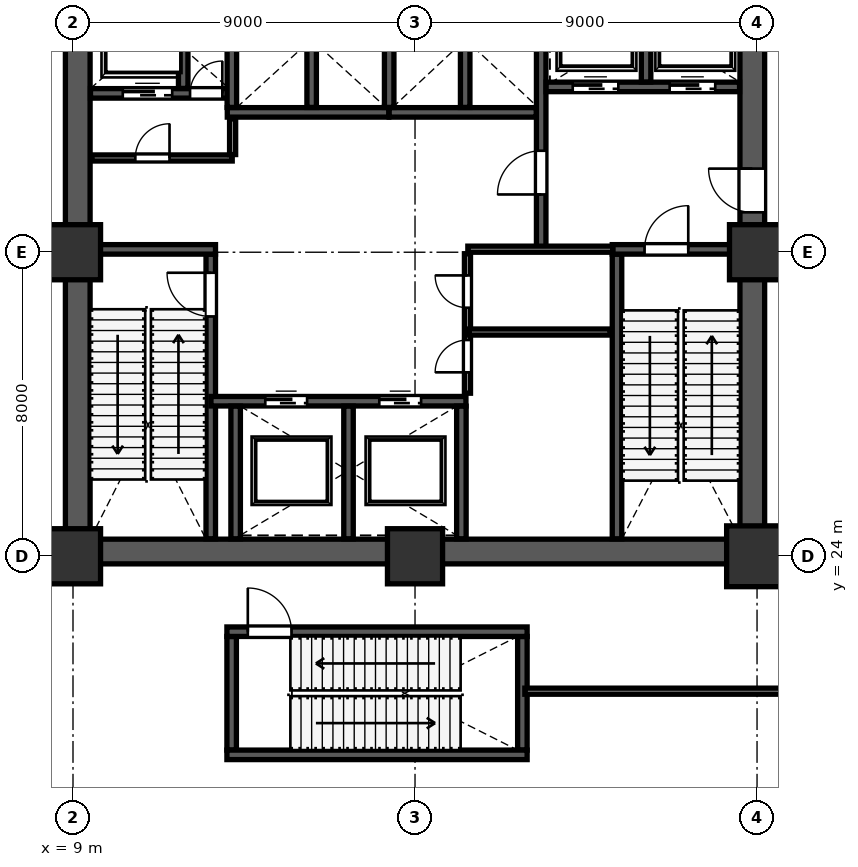
"""IFC4 building model, lengths in metres.
Left out: names, types, materials, properties, quantities, classifications, styles, units other than length and angle.
Written with IfcOpenShell. Run it as: python <this file> out.ifc"""

import sys

from ifc_helpers import new_model, si_unit, direction, frame, frame_2d, origin, origin_2d, place, context, subcontext, project, spatial, rectangle, extrude, source, transform, mapped, element, fill, save


model = new_model("IFC4")
c1 = context("Model", 3, precision=1e-05, world=origin(), true_north=direction((0.0, 1.0)))
c2 = subcontext(c1, "Body", "Model", "MODEL_VIEW")
j1 = project(units=[si_unit("LENGTHUNIT", "METRE"), si_unit("PLANEANGLEUNIT", "RADIAN")], contexts=[c1])
p1 = place(None, origin())
s1 = spatial("IfcSite", under=j1, at=p1, CompositionType="ELEMENT")
p2 = place(p1, origin())
s2 = spatial("IfcBuilding", under=s1, at=p2, CompositionType="ELEMENT")
p3 = place(p2, frame((0.0, 0.0, 22.2)))
s3 = spatial("IfcBuildingStorey", under=s2, at=p3, CompositionType="ELEMENT", Elevation=22.2)
m1 = source(origin(), c2, "Body", "SweptSolid", [
    extrude(rectangle(XDim=1.45, YDim=1.45, at=origin_2d()), origin(), (0.0, 0.0, 1.0), 5.799),
])
p4 = place(p3, frame((9.0, 24.0, 0.001), z_axis=(0.0, 0.0, 1.0), x_axis=(1.0, 0.0, 0.0)))
e1 = element("IfcColumn", 1, at=p4, inside=s3, PredefinedType="COLUMN", context=c2, shape_type="MappedRepresentation", body=[
    mapped(m1, transform((0.0, 0.0, 0.0), scale=1.0)),
])
m2 = source(origin(), c2, "Body", "SweptSolid", [
    extrude(rectangle(XDim=1.45, YDim=1.45, at=origin_2d()), origin(), (0.0, 0.0, 1.0), 5.799),
])
p5 = place(p3, frame((9.0, 32.0, 0.001), z_axis=(0.0, 0.0, 1.0), x_axis=(1.0, 0.0, 0.0)))
e2 = element("IfcColumn", 2, at=p5, inside=s3, PredefinedType="COLUMN", context=c2, shape_type="MappedRepresentation", body=[
    mapped(m2, transform((0.0, 0.0, 0.0), scale=1.0)),
])
p6 = place(p3, frame((18.0, 24.0, 0.001), z_axis=(0.0, 0.0, 1.0), x_axis=(1.0, 0.0, 0.0)))
e3 = element("IfcColumn", 3, at=p6, inside=s3, PredefinedType="COLUMN", context=c2, shape_type="MappedRepresentation", body=[
    mapped(m1, transform((0.0, 0.0, 0.0), scale=1.0)),
])
m3 = source(origin(), c2, "Body", "SweptSolid", [
    extrude(rectangle(XDim=1.6, YDim=1.6, at=origin_2d()), origin(), (0.0, 0.0, 1.0), 5.799),
])
p7 = place(p3, frame((27.0, 24.0, 0.001), z_axis=(0.0, 0.0, 1.0), x_axis=(1.0, 0.0, 0.0)))
e4 = element("IfcColumn", 4, at=p7, inside=s3, PredefinedType="COLUMN", context=c2, shape_type="MappedRepresentation", body=[
    mapped(m3, transform((0.0, 0.0, 0.0), scale=1.0)),
])
p8 = place(p3, frame((27.0, 32.0, 0.001), z_axis=(0.0, 0.0, 1.0), x_axis=(1.0, 0.0, 0.0)))
e5 = element("IfcColumn", 5, at=p8, inside=s3, PredefinedType="COLUMN", context=c2, shape_type="MappedRepresentation", body=[
    mapped(m2, transform((0.0, 0.0, 0.0), scale=1.0)),
])
p9 = place(p3, frame((9.125, 24.45, 0.0), z_axis=(0.0, 0.0, 1.0), x_axis=(0.0, 1.0, 0.0)))
e6 = element("IfcWall", 6, at=p9, inside=s3, PredefinedType="SHEAR", context=c2, shape_type="SweptSolid", body=[
    extrude(rectangle(XDim=15.1, YDim=0.65, at=frame_2d((7.55, 0.0))), origin(), (0.0, 0.0, 1.0), 5.52),
])
p10 = place(p3, frame((26.875, 24.45, 0.0), z_axis=(0.0, 0.0, 1.0), x_axis=(0.0, 1.0, 0.0)))
e7 = element("IfcWall", 7, at=p10, inside=s3, PredefinedType="SHEAR", context=c2, shape_type="SweptSolid", body=[
    extrude(rectangle(XDim=15.1, YDim=0.65, at=frame_2d((7.55, 0.0))), origin(), (0.0, 0.0, 1.0), 5.52),
])
p11 = place(p10, frame((8.6, 0.0, 0.0)))
e8 = element("IfcOpeningElement", 8, at=p11, cuts=e7, PredefinedType="OPENING", context=c2, shape_type="SweptSolid", body=[
    extrude(rectangle(XDim=1.15, YDim=2.2, at=frame_2d((0.575, 1.1))), frame((0.0, 0.335, 0.0), z_axis=(0.0, -1.0, 0.0), x_axis=(1.0, 0.0, 0.0)), (0.0, 0.0, 1.0), 0.67),
])
p12 = place(p3, frame((8.8, 24.125, 0.0), z_axis=(0.0, 0.0, 1.0), x_axis=(1.0, 0.0, 0.0)))
e9 = element("IfcWall", 9, at=p12, inside=s3, PredefinedType="SHEAR", context=c2, shape_type="SweptSolid", body=[
    extrude(rectangle(XDim=18.4, YDim=0.65, at=frame_2d((9.2, 0.0))), origin(), (0.0, 0.0, 1.0), 5.52),
])
p13 = place(p3, frame((12.625, 24.46, 0.0), z_axis=(0.0, 0.0, 1.0), x_axis=(0.0, 1.0, 0.0)))
e10 = element("IfcWall", 10, at=p13, inside=s3, PredefinedType="SHEAR", context=c2, shape_type="SweptSolid", body=[
    extrude(rectangle(XDim=7.49, YDim=0.25, at=frame_2d((3.745, 0.0))), origin(), (0.0, 0.0, 1.0), 5.52),
])
p14 = place(p13, frame((5.85, 0.0, 0.0)))
e11 = element("IfcOpeningElement", 11, at=p14, cuts=e10, PredefinedType="OPENING", context=c2, shape_type="SweptSolid", body=[
    extrude(rectangle(XDim=1.15, YDim=2.2, at=frame_2d((0.575, 1.1))), frame((0.0, 0.135, 0.0), z_axis=(0.0, -1.0, 0.0), x_axis=(1.0, 0.0, 0.0)), (0.0, 0.0, 1.0), 0.27),
])
p15 = place(p3, frame((9.46, 32.075, 0.0), z_axis=(0.0, 0.0, 1.0), x_axis=(1.0, 0.0, 0.0)))
e12 = element("IfcWall", 12, at=p15, inside=s3, PredefinedType="SHEAR", context=c2, shape_type="SweptSolid", body=[
    extrude(rectangle(XDim=3.29, YDim=0.25, at=frame_2d((1.645, 0.0))), origin(), (0.0, 0.0, 1.0), 5.52),
])
p16 = place(p3, frame((23.315, 24.46, 0.0), z_axis=(0.0, 0.0, 1.0), x_axis=(0.0, 1.0, 0.0)))
e13 = element("IfcWall", 13, at=p16, inside=s3, PredefinedType="SHEAR", context=c2, shape_type="SweptSolid", body=[
    extrude(rectangle(XDim=7.49, YDim=0.25, at=frame_2d((3.745, 0.0))), origin(), (0.0, 0.0, 1.0), 5.52),
])
p17 = place(p3, frame((23.19, 32.075, 0.0), z_axis=(0.0, 0.0, 1.0), x_axis=(1.0, 0.0, 0.0)))
e14 = element("IfcWall", 14, at=p17, inside=s3, PredefinedType="SHEAR", context=c2, shape_type="SweptSolid", body=[
    extrude(rectangle(XDim=3.35, YDim=0.25, at=frame_2d((1.675, 0.0))), origin(), (0.0, 0.0, 1.0), 5.52),
])
p18 = place(p17, frame((0.85, 0.0, 0.0)))
e15 = element("IfcOpeningElement", 15, at=p18, cuts=e14, PredefinedType="OPENING", context=c2, shape_type="SweptSolid", body=[
    extrude(rectangle(XDim=1.15, YDim=2.2, at=frame_2d((0.575, 1.1))), frame((0.0, 0.135, 0.0), z_axis=(0.0, -1.0, 0.0), x_axis=(1.0, 0.0, 0.0)), (0.0, 0.0, 1.0), 0.27),
])
p19 = place(p3, frame((21.32, 32.12, 0.0), z_axis=(0.0, 0.0, 1.0), x_axis=(0.0, 1.0, 0.0)))
e16 = element("IfcWall", 16, at=p19, inside=s3, PredefinedType="SHEAR", context=c2, shape_type="SweptSolid", body=[
    extrude(rectangle(XDim=7.42, YDim=0.25, at=frame_2d((3.71, 0.0))), origin(), (0.0, 0.0, 1.0), 5.52),
])
p20 = place(p19, frame((1.4, 0.0, 0.0)))
e17 = element("IfcOpeningElement", 17, at=p20, cuts=e16, PredefinedType="OPENING", context=c2, shape_type="SweptSolid", body=[
    extrude(rectangle(XDim=1.15, YDim=2.2, at=frame_2d((0.575, 1.1))), frame((0.0, 0.135, 0.0), z_axis=(0.0, -1.0, 0.0), x_axis=(1.0, 0.0, 0.0)), (0.0, 0.0, 1.0), 0.27),
])
p21 = place(p3, frame((9.46, 36.18, 0.0), z_axis=(0.0, 0.0, 1.0), x_axis=(1.0, 0.0, 0.0)))
e18 = element("IfcWall", 18, at=p21, inside=s3, PredefinedType="SHEAR", context=c2, shape_type="SweptSolid", body=[
    extrude(rectangle(XDim=3.79, YDim=0.25, at=frame_2d((1.895, 0.0))), origin(), (0.0, 0.0, 1.0), 5.52),
])
p22 = place(p21, frame((2.62, 0.0, 0.0)))
e19 = element("IfcOpeningElement", 19, at=p22, cuts=e18, PredefinedType="OPENING", context=c2, shape_type="SweptSolid", body=[
    extrude(rectangle(XDim=0.85, YDim=2.1, at=frame_2d((0.425, 1.05))), frame((0.0, 0.135, 0.0), z_axis=(0.0, -1.0, 0.0), x_axis=(1.0, 0.0, 0.0)), (0.0, 0.0, 1.0), 0.27),
])
p23 = place(p21, frame((0.85, 0.0, 0.0)))
e20 = element("IfcOpeningElement", 20, at=p23, cuts=e18, PredefinedType="OPENING", context=c2, shape_type="SweptSolid", body=[
    extrude(rectangle(XDim=1.3, YDim=2.25, at=frame_2d((0.65, 1.125))), frame((0.0, 0.135, 0.0), z_axis=(0.0, -1.0, 0.0), x_axis=(1.0, 0.0, 0.0)), (0.0, 0.0, 1.0), 0.27),
])
p24 = place(p3, frame((11.9, 36.31, 0.0), z_axis=(0.0, 0.0, 1.0), x_axis=(0.0, 1.0, 0.0)))
e21 = element("IfcWall", 21, at=p24, inside=s3, PredefinedType="SHEAR", context=c2, shape_type="SweptSolid", body=[
    extrude(rectangle(XDim=3.23, YDim=0.25, at=frame_2d((1.615, 0.0))), origin(), (0.0, 0.0, 1.0), 5.52),
])
p25 = place(p3, frame((21.45, 36.35, 0.0), z_axis=(0.0, 0.0, 1.0), x_axis=(1.0, 0.0, 0.0)))
e22 = element("IfcWall", 22, at=p25, inside=s3, PredefinedType="SHEAR", context=c2, shape_type="SweptSolid", body=[
    extrude(rectangle(XDim=5.09, YDim=0.25, at=frame_2d((2.545, 0.0))), origin(), (0.0, 0.0, 1.0), 5.52),
])
p26 = place(p25, frame((0.7, 0.0, 0.0)))
e23 = element("IfcOpeningElement", 23, at=p26, cuts=e22, PredefinedType="OPENING", context=c2, shape_type="SweptSolid", body=[
    extrude(rectangle(XDim=1.2, YDim=2.2, at=frame_2d((0.6, 1.1))), frame((0.0, 0.135, 0.0), z_axis=(0.0, -1.0, 0.0), x_axis=(1.0, 0.0, 0.0)), (0.0, 0.0, 1.0), 0.27),
])
p27 = place(p25, frame((3.25, 0.0, 0.0)))
e24 = element("IfcOpeningElement", 24, at=p27, cuts=e22, PredefinedType="OPENING", context=c2, shape_type="SweptSolid", body=[
    extrude(rectangle(XDim=1.2, YDim=2.2, at=frame_2d((0.6, 1.1))), frame((0.0, 0.135, 0.0), z_axis=(0.0, -1.0, 0.0), x_axis=(1.0, 0.0, 0.0)), (0.0, 0.0, 1.0), 0.27),
])
p28 = place(p3, frame((24.08, 36.48, 0.0), z_axis=(0.0, 0.0, 1.0), x_axis=(0.0, 1.0, 0.0)))
e25 = element("IfcWall", 25, at=p28, inside=s3, PredefinedType="SHEAR", context=c2, shape_type="SweptSolid", body=[
    extrude(rectangle(XDim=3.06, YDim=0.25, at=frame_2d((1.53, 0.0))), origin(), (0.0, 0.0, 1.0), 5.52),
])
p29 = place(p3, frame((12.63, 28.08, 0.0), z_axis=(0.0, 0.0, 1.0), x_axis=(1.0, 0.0, 0.0)))
e26 = element("IfcWall", 26, at=p29, inside=s3, PredefinedType="SHEAR", context=c2, shape_type="SweptSolid", body=[
    extrude(rectangle(XDim=6.71, YDim=0.25, at=frame_2d((3.355, 0.0))), origin(), (0.0, 0.0, 1.0), 5.52),
])
p30 = place(p29, frame((1.43, 0.0, 0.0)))
e27 = element("IfcOpeningElement", 27, at=p30, cuts=e26, PredefinedType="OPENING", context=c2, shape_type="SweptSolid", body=[
    extrude(rectangle(XDim=1.1, YDim=2.2, at=frame_2d((0.55, 1.1))), frame((0.0, 0.135, 0.0), z_axis=(0.0, -1.0, 0.0), x_axis=(1.0, 0.0, 0.0)), (0.0, 0.0, 1.0), 0.27),
])
p31 = place(p29, frame((4.43, 0.0, 0.0)))
e28 = element("IfcOpeningElement", 28, at=p31, cuts=e26, PredefinedType="OPENING", context=c2, shape_type="SweptSolid", body=[
    extrude(rectangle(XDim=1.1, YDim=2.2, at=frame_2d((0.55, 1.1))), frame((0.0, 0.135, 0.0), z_axis=(0.0, -1.0, 0.0), x_axis=(1.0, 0.0, 0.0)), (0.0, 0.0, 1.0), 0.27),
])
for number, where, z_axis, x_axis in (
    (29, (13.28, 24.46, 0.0), (0.0, 0.0, 1.0), (0.0, 1.0, 0.0)),
    (30, (16.25, 24.46, 0.0), (0.0, 0.0, 1.0), (0.0, 1.0, 0.0)),
    (31, (19.22, 24.46, 0.0), (0.0, 0.0, 1.0), (0.0, 1.0, 0.0)),
):
    element("IfcWall", number, at=place(p3, frame(where, z_axis=z_axis, x_axis=x_axis)), inside=s3, PredefinedType="SHEAR", context=c2, shape_type="SweptSolid", body=[
        extrude(rectangle(XDim=3.49, YDim=0.25, at=frame_2d((1.745, 0.0))), origin(), (0.0, 0.0, 1.0), 5.52),
    ])
p32 = place(p3, frame((13.06, 35.68, 0.0), z_axis=(0.0, 0.0, 1.0), x_axis=(1.0, 0.0, 0.0)))
e32 = element("IfcWall", 32, at=p32, inside=s3, PredefinedType="SHEAR", context=c2, shape_type="SweptSolid", body=[
    extrude(rectangle(XDim=4.25, YDim=0.25, at=frame_2d((2.125, 0.0))), origin(), (0.0, 0.0, 1.0), 5.52),
])
for number, where, z_axis, x_axis in (
    (33, (13.18, 35.81, 0.0), (0.0, 0.0, 1.0), (0.0, 1.0, 0.0)),
    (34, (15.28, 35.81, 0.0), (0.0, 0.0, 1.0), (0.0, 1.0, 0.0)),
):
    element("IfcWall", number, at=place(p3, frame(where, z_axis=z_axis, x_axis=x_axis)), inside=s3, PredefinedType="SHEAR", context=c2, shape_type="SweptSolid", body=[
        extrude(rectangle(XDim=3.73, YDim=0.25, at=frame_2d((1.865, 0.0))), origin(), (0.0, 0.0, 1.0), 5.52),
    ])
p33 = place(p3, frame((17.32, 35.68, 0.0), z_axis=(0.0, 0.0, 1.0), x_axis=(1.0, 0.0, 0.0)))
e35 = element("IfcWall", 35, at=p33, inside=s3, PredefinedType="SHEAR", context=c2, shape_type="SweptSolid", body=[
    extrude(rectangle(XDim=3.87, YDim=0.25, at=frame_2d((1.935, 0.0))), origin(), (0.0, 0.0, 1.0), 5.52),
])
for number, where, z_axis, x_axis in (
    (36, (17.32, 35.81, 0.0), (0.0, 0.0, 1.0), (0.0, 1.0, 0.0)),
    (37, (19.32, 35.81, 0.0), (0.0, 0.0, 1.0), (0.0, 1.0, 0.0)),
):
    element("IfcWall", number, at=place(p3, frame(where, z_axis=z_axis, x_axis=x_axis)), inside=s3, PredefinedType="SHEAR", context=c2, shape_type="SweptSolid", body=[
        extrude(rectangle(XDim=3.73, YDim=0.25, at=frame_2d((1.865, 0.0))), origin(), (0.0, 0.0, 1.0), 5.52),
    ])
for number, where, z_axis, x_axis in (
    (38, (13.175, 18.9, 0.0), (0.0, 0.0, 1.0), (0.0, 1.0, 0.0)),
    (39, (20.825, 18.9, 0.0), (0.0, 0.0, 1.0), (0.0, 1.0, 0.0)),
):
    element("IfcWall", number, at=place(p3, frame(where, z_axis=z_axis, x_axis=x_axis)), inside=s3, PredefinedType="SHEAR", context=c2, shape_type="SweptSolid", body=[
        extrude(rectangle(XDim=2.99, YDim=0.25, at=frame_2d((1.495, 0.0))), origin(), (0.0, 0.0, 1.0), 5.52),
    ])
p34 = place(p3, frame((13.05, 18.775, 0.0), z_axis=(0.0, 0.0, 1.0), x_axis=(1.0, 0.0, 0.0)))
e40 = element("IfcWall", 40, at=p34, inside=s3, PredefinedType="SHEAR", context=c2, shape_type="SweptSolid", body=[
    extrude(rectangle(XDim=7.9, YDim=0.25, at=frame_2d((3.95, 0.0))), origin(), (0.0, 0.0, 1.0), 5.52),
])
p35 = place(p3, frame((13.05, 22.015, 0.0), z_axis=(0.0, 0.0, 1.0), x_axis=(1.0, 0.0, 0.0)))
e41 = element("IfcWall", 41, at=p35, inside=s3, PredefinedType="SHEAR", context=c2, shape_type="SweptSolid", body=[
    extrude(rectangle(XDim=7.9, YDim=0.25, at=frame_2d((3.95, 0.0))), origin(), (0.0, 0.0, 1.0), 5.52),
])
p36 = place(p35, frame((0.55, 0.0, 0.0)))
e42 = element("IfcOpeningElement", 42, at=p36, cuts=e41, PredefinedType="OPENING", context=c2, shape_type="SweptSolid", body=[
    extrude(rectangle(XDim=1.15, YDim=2.2, at=frame_2d((0.575, 1.1))), frame((0.0, 0.135, 0.0), z_axis=(0.0, -1.0, 0.0), x_axis=(1.0, 0.0, 0.0)), (0.0, 0.0, 1.0), 0.27),
])
p37 = place(p3, frame((9.49, 34.48, 0.0), z_axis=(0.0, 0.0, 1.0), x_axis=(1.0, 0.0, 0.0)))
e43 = element("IfcWall", 43, at=p37, inside=s3, PredefinedType="PARTITIONING", context=c2, shape_type="SweptSolid", body=[
    extrude(rectangle(XDim=3.7, YDim=0.16, at=frame_2d((1.85, 0.0))), origin(), (0.0, 0.0, 1.0), 5.52),
])
p38 = place(p37, frame((1.15, 0.0, 0.0)))
e44 = element("IfcOpeningElement", 44, at=p38, cuts=e43, PredefinedType="OPENING", context=c2, shape_type="SweptSolid", body=[
    extrude(rectangle(XDim=0.9, YDim=2.15, at=frame_2d((0.45, 1.075))), frame((0.0, 0.09, 0.0), z_axis=(0.0, -1.0, 0.0), x_axis=(1.0, 0.0, 0.0)), (0.0, 0.0, 1.0), 0.18),
])
p39 = place(p3, frame((13.2, 34.57, 0.0), z_axis=(0.0, 0.0, 1.0), x_axis=(0.0, 1.0, 0.0)))
e45 = element("IfcWall", 45, at=p39, inside=s3, PredefinedType="PARTITIONING", context=c2, shape_type="SweptSolid", body=[
    extrude(rectangle(XDim=0.94, YDim=0.16, at=frame_2d((0.47, 0.0))), origin(), (0.0, 0.0, 1.0), 5.52),
])
p40 = place(p3, frame((19.39, 32.08, 0.0), z_axis=(0.0, 0.0, 1.0), x_axis=(1.0, 0.0, 0.0)))
e46 = element("IfcWall", 46, at=p40, inside=s3, PredefinedType="PARTITIONING", context=c2, shape_type="SweptSolid", body=[
    extrude(rectangle(XDim=3.82, YDim=0.16, at=frame_2d((1.91, 0.0))), origin(), (0.0, 0.0, 1.0), 5.52),
])
p41 = place(p3, frame((19.38, 28.29, 0.0), z_axis=(0.0, 0.0, 1.0), x_axis=(0.0, 1.0, 0.0)))
e47 = element("IfcWall", 47, at=p41, inside=s3, PredefinedType="PARTITIONING", context=c2, shape_type="SweptSolid", body=[
    extrude(rectangle(XDim=3.67, YDim=0.16, at=frame_2d((1.835, 0.0))), origin(), (0.0, 0.0, 1.0), 5.52),
])
p42 = place(p41, frame((0.55, 0.0, 0.0)))
e48 = element("IfcOpeningElement", 48, at=p42, cuts=e47, PredefinedType="OPENING", context=c2, shape_type="SweptSolid", body=[
    extrude(rectangle(XDim=0.85, YDim=2.1, at=frame_2d((0.425, 1.05))), frame((0.0, 0.09, 0.0), z_axis=(0.0, -1.0, 0.0), x_axis=(1.0, 0.0, 0.0)), (0.0, 0.0, 1.0), 0.18),
])
p43 = place(p41, frame((2.25, 0.0, 0.0)))
e49 = element("IfcOpeningElement", 49, at=p43, cuts=e47, PredefinedType="OPENING", context=c2, shape_type="SweptSolid", body=[
    extrude(rectangle(XDim=0.85, YDim=2.1, at=frame_2d((0.425, 1.05))), frame((0.0, 0.09, 0.0), z_axis=(0.0, -1.0, 0.0), x_axis=(1.0, 0.0, 0.0)), (0.0, 0.0, 1.0), 0.18),
])
p44 = place(p3, frame((19.42, 29.9, 0.0), z_axis=(0.0, 0.0, 1.0), x_axis=(1.0, 0.0, 0.0)))
e50 = element("IfcWall", 50, at=p44, inside=s3, PredefinedType="PARTITIONING", context=c2, shape_type="SweptSolid", body=[
    extrude(rectangle(XDim=3.72, YDim=0.16, at=frame_2d((1.86, 0.0))), origin(), (0.0, 0.0, 1.0), 5.52),
])
p45 = place(p3, frame((20.89, 20.45, 0.0), z_axis=(0.0, 0.0, 1.0), x_axis=(1.0, 0.0, 0.0)))
e51 = element("IfcWall", 51, at=p45, inside=s3, PredefinedType="PARTITIONING", context=c2, shape_type="SweptSolid", body=[
    extrude(rectangle(XDim=27.07, YDim=0.16, at=frame_2d((13.535, 0.0))), origin(), (0.0, 0.0, 1.0), 4.65),
])
p46 = place(p45, frame((10.6, 0.0, 0.0)))
e52 = element("IfcOpeningElement", 52, at=p46, cuts=e51, PredefinedType="OPENING", context=c2, shape_type="SweptSolid", body=[
    extrude(rectangle(XDim=1.1, YDim=2.2, at=frame_2d((0.55, 1.1))), frame((0.0, 0.09, 0.0), z_axis=(0.0, -1.0, 0.0), x_axis=(1.0, 0.0, 0.0)), (0.0, 0.0, 1.0), 0.18),
])
m4 = source(origin(), c2, "Body", "SweptSolid", [
    extrude(rectangle(XDim=1.15, YDim=2.2, at=frame_2d((0.575, 1.1))), frame((0.0, 0.025, 0.0), z_axis=(0.0, -1.0, 0.0), x_axis=(1.0, 0.0, 0.0)), (0.0, 0.0, 1.0), 0.05),
])
p47 = place(p14, origin())
e53 = element("IfcDoor", 53, at=p47, inside=s3, OperationType="SINGLE_SWING_RIGHT", PredefinedType="DOOR", context=c2, shape_type="MappedRepresentation", body=[
    mapped(m4, transform((0.0, 0.0, 0.0), scale=1.0)),
])
fill(e11, e53)
m5 = source(origin(), c2, "Body", "SweptSolid", [
    extrude(rectangle(XDim=1.15, YDim=2.2, at=frame_2d((0.575, 1.1))), frame((0.0, 0.025, 0.0), z_axis=(0.0, -1.0, 0.0), x_axis=(1.0, 0.0, 0.0)), (0.0, 0.0, 1.0), 0.05),
])
p48 = place(p20, origin())
e54 = element("IfcDoor", 54, at=p48, inside=s3, OperationType="SINGLE_SWING_LEFT", PredefinedType="DOOR", context=c2, shape_type="MappedRepresentation", body=[
    mapped(m5, transform((0.0, 0.0, 0.0), scale=1.0)),
])
fill(e17, e54)
p49 = place(p18, origin())
e55 = element("IfcDoor", 55, at=p49, inside=s3, OperationType="SINGLE_SWING_RIGHT", PredefinedType="DOOR", context=c2, shape_type="MappedRepresentation", body=[
    mapped(m4, transform((0.0, 0.0, 0.0), scale=1.0)),
])
fill(e15, e55)
p50 = place(p11, origin())
e56 = element("IfcDoor", 56, at=p50, inside=s3, OperationType="SINGLE_SWING_RIGHT", PredefinedType="DOOR", context=c2, shape_type="MappedRepresentation", body=[
    mapped(m5, transform((0.0, 0.0, 0.0), scale=1.0)),
])
fill(e8, e56)
p51 = place(p36, origin())
e57 = element("IfcDoor", 57, at=p51, inside=s3, OperationType="SINGLE_SWING_LEFT", PredefinedType="DOOR", context=c2, shape_type="MappedRepresentation", body=[
    mapped(m4, transform((0.0, 0.0, 0.0), scale=1.0)),
])
fill(e42, e57)
m6 = source(origin(), c2, "Body", "SweptSolid", [
    extrude(rectangle(XDim=0.85, YDim=2.1, at=frame_2d((0.425, 1.05))), frame((0.0, 0.025, 0.0), z_axis=(0.0, -1.0, 0.0), x_axis=(1.0, 0.0, 0.0)), (0.0, 0.0, 1.0), 0.05),
])
p52 = place(p22, origin())
e58 = element("IfcDoor", 58, at=p52, inside=s3, OperationType="SINGLE_SWING_RIGHT", PredefinedType="DOOR", context=c2, shape_type="MappedRepresentation", body=[
    mapped(m6, transform((0.0, 0.0, 0.0), scale=1.0)),
])
fill(e19, e58)
m7 = source(origin(), c2, "Body", "SweptSolid", [
    extrude(rectangle(XDim=1.1, YDim=2.2, at=frame_2d((0.55, 1.1))), frame((0.0, 0.025, 0.0), z_axis=(0.0, -1.0, 0.0), x_axis=(1.0, 0.0, 0.0)), (0.0, 0.0, 1.0), 0.05),
])
p53 = place(p30, origin())
e59 = element("IfcDoor", 59, at=p53, inside=s3, OperationType="SLIDING_TO_LEFT", PredefinedType="DOOR", context=c2, shape_type="MappedRepresentation", body=[
    mapped(m7, transform((0.0, 0.0, 0.0), scale=1.0)),
])
fill(e27, e59)
p54 = place(p31, origin())
e60 = element("IfcDoor", 60, at=p54, inside=s3, OperationType="SLIDING_TO_RIGHT", PredefinedType="DOOR", context=c2, shape_type="MappedRepresentation", body=[
    mapped(m7, transform((0.0, 0.0, 0.0), scale=1.0)),
])
fill(e28, e60)
m8 = source(origin(), c2, "Body", "SweptSolid", [
    extrude(rectangle(XDim=1.2, YDim=2.2, at=frame_2d((0.6, 1.1))), frame((0.0, 0.025, 0.0), z_axis=(0.0, -1.0, 0.0), x_axis=(1.0, 0.0, 0.0)), (0.0, 0.0, 1.0), 0.05),
])
p55 = place(p26, origin())
e61 = element("IfcDoor", 61, at=p55, inside=s3, OperationType="SLIDING_TO_LEFT", PredefinedType="DOOR", context=c2, shape_type="MappedRepresentation", body=[
    mapped(m8, transform((0.0, 0.0, 0.0), scale=1.0)),
])
fill(e23, e61)
p56 = place(p27, origin())
e62 = element("IfcDoor", 62, at=p56, inside=s3, OperationType="SLIDING_TO_RIGHT", PredefinedType="DOOR", context=c2, shape_type="MappedRepresentation", body=[
    mapped(m8, transform((0.0, 0.0, 0.0), scale=1.0)),
])
fill(e24, e62)
m9 = source(origin(), c2, "Body", "SweptSolid", [
    extrude(rectangle(XDim=1.3, YDim=2.25, at=frame_2d((0.65, 1.125))), frame((0.0, 0.025, 0.0), z_axis=(0.0, -1.0, 0.0), x_axis=(1.0, 0.0, 0.0)), (0.0, 0.0, 1.0), 0.05),
])
p57 = place(p23, origin())
e63 = element("IfcDoor", 63, at=p57, inside=s3, OperationType="SLIDING_TO_LEFT", PredefinedType="DOOR", context=c2, shape_type="MappedRepresentation", body=[
    mapped(m9, transform((0.0, 0.0, 0.0), scale=1.0)),
])
fill(e20, e63)
m10 = source(origin(), c2, "Body", "SweptSolid", [
    extrude(rectangle(XDim=0.9, YDim=2.15, at=frame_2d((0.45, 1.075))), frame((0.0, 0.025, 0.0), z_axis=(0.0, -1.0, 0.0), x_axis=(1.0, 0.0, 0.0)), (0.0, 0.0, 1.0), 0.05),
])
p58 = place(p38, origin())
e64 = element("IfcDoor", 64, at=p58, inside=s3, OperationType="SINGLE_SWING_RIGHT", PredefinedType="DOOR", context=c2, shape_type="MappedRepresentation", body=[
    mapped(m10, transform((0.0, 0.0, 0.0), scale=1.0)),
])
fill(e44, e64)
p59 = place(p42, origin())
e65 = element("IfcDoor", 65, at=p59, inside=s3, OperationType="SINGLE_SWING_LEFT", PredefinedType="DOOR", context=c2, shape_type="MappedRepresentation", body=[
    mapped(m6, transform((0.0, 0.0, 0.0), scale=1.0)),
])
fill(e48, e65)
p60 = place(p43, origin())
e66 = element("IfcDoor", 66, at=p60, inside=s3, OperationType="SINGLE_SWING_RIGHT", PredefinedType="DOOR", context=c2, shape_type="MappedRepresentation", body=[
    mapped(m6, transform((0.0, 0.0, 0.0), scale=1.0)),
])
fill(e49, e66)
save(model, sys.argv[1])
